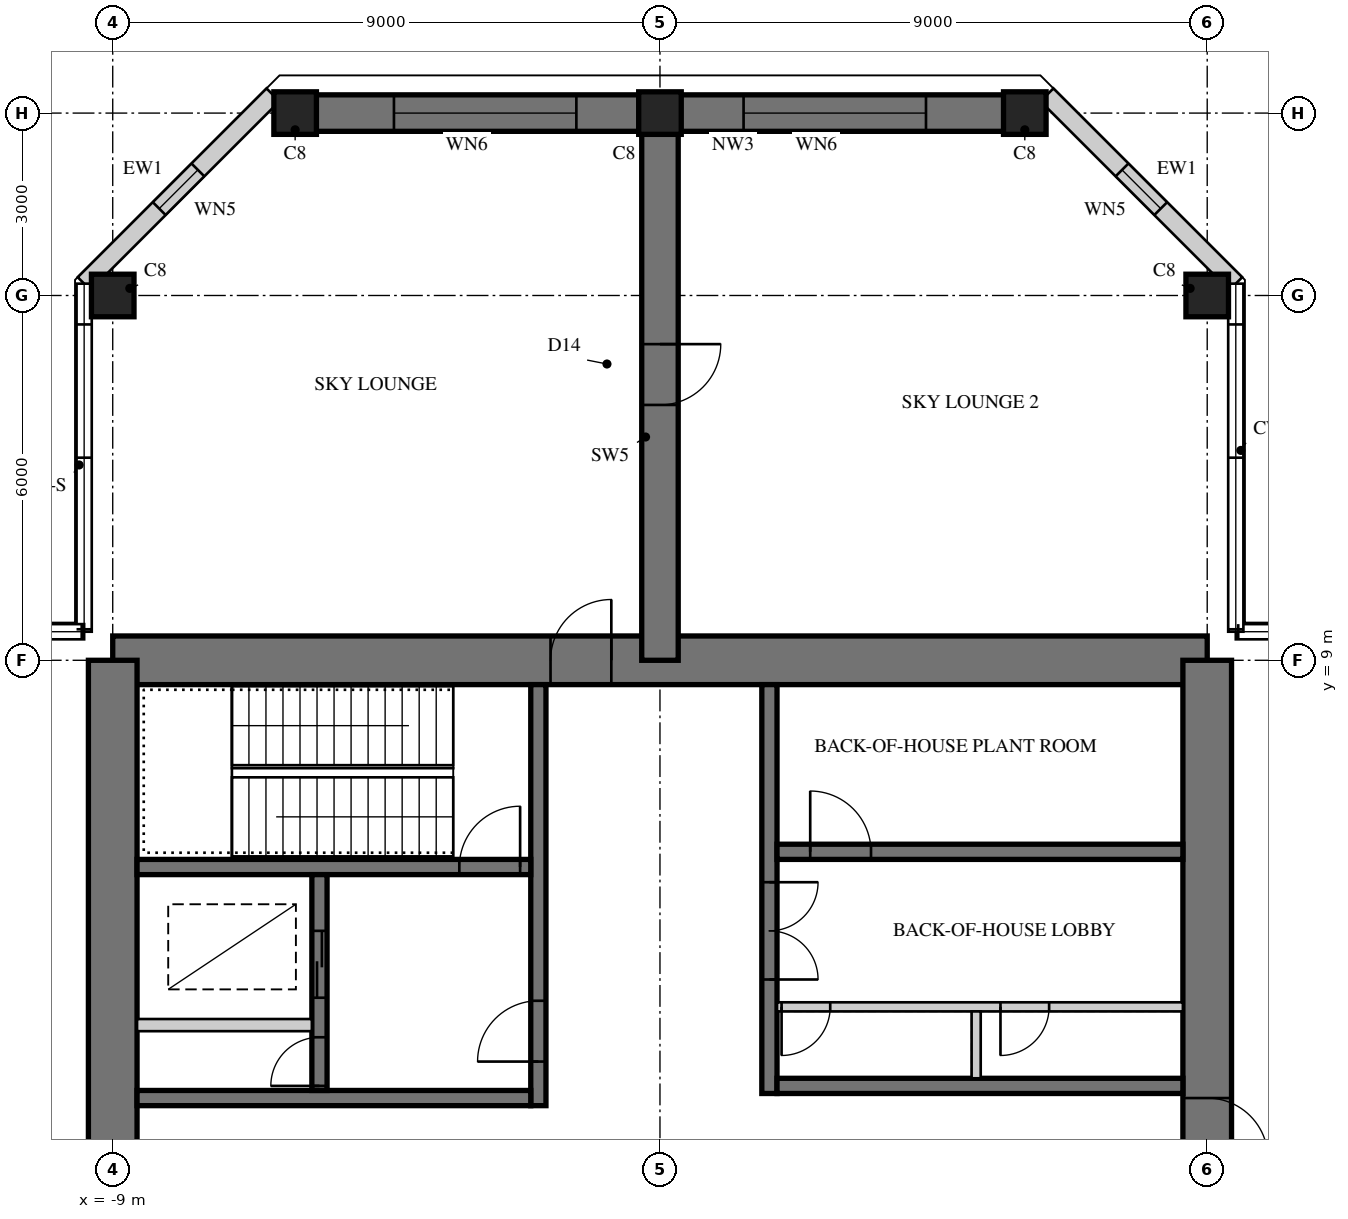
"""IFC4 building model, lengths in metres.
Left out: names, types, materials, properties, quantities, classifications, styles, units other than length and angle.
Written with IfcOpenShell. Run it as: python <this file> out.ifc"""

import sys

from ifc_helpers import new_model, si_unit, direction, frame, frame_2d, origin, origin_2d, place, context, subcontext, project, spatial, rectangle, hollow_rectangle, extrude, element, fill, save


model = new_model("IFC4")
c1 = context("Model", 3, precision=1e-05, world=origin(), true_north=direction((0.0, 1.0)))
c2 = subcontext(c1, "Body", "Model", "MODEL_VIEW")
j1 = project(units=[si_unit("LENGTHUNIT", "METRE"), si_unit("PLANEANGLEUNIT", "RADIAN")], contexts=[c1])
p1 = place(None, origin())
s1 = spatial("IfcSite", under=j1, at=p1, CompositionType="ELEMENT")
p2 = place(p1, origin())
s2 = spatial("IfcBuilding", under=s1, at=p2, CompositionType="ELEMENT")
p3 = place(p2, frame((0.0, 0.0, 288.3)))
s3 = spatial("IfcBuildingStorey", under=s2, at=p3, CompositionType="ELEMENT", Elevation=288.3)
p4 = place(p3, frame((9.0, 9.0, 0.0), z_axis=(0.0, 0.0, 1.0), x_axis=(-1.0, 0.0, 0.0)))
e1 = element("IfcWall", 1, at=p4, inside=s3, PredefinedType="SHEAR", context=c2, shape_type="SweptSolid", body=[
    extrude(rectangle(XDim=18.0, YDim=0.8, at=frame_2d((9.0, 0.0))), origin(), (0.0, 0.0, 1.0), 5.0),
])
p5 = place(p4, frame((9.8, 0.0, 0.0)))
e2 = element("IfcOpeningElement", 2, at=p5, cuts=e1, PredefinedType="OPENING", context=c2, shape_type="SweptSolid", body=[
    extrude(rectangle(XDim=1.0, YDim=2.4, at=frame_2d((0.5, 1.2))), frame((0.0, 0.41, 0.0), z_axis=(0.0, -1.0, 0.0), x_axis=(1.0, 0.0, 0.0)), (0.0, 0.0, 1.0), 0.82),
])
p6 = place(p3, frame((9.0, -9.0, 0.0), z_axis=(0.0, 0.0, 1.0), x_axis=(0.0, 1.0, 0.0)))
e3 = element("IfcWall", 3, at=p6, inside=s3, PredefinedType="SHEAR", context=c2, shape_type="SweptSolid", body=[
    extrude(rectangle(XDim=18.0, YDim=0.8, at=frame_2d((9.0, 0.0))), origin(), (0.0, 0.0, 1.0), 5.0),
])
p7 = place(p6, frame((9.8, 0.0, 0.0)))
e4 = element("IfcOpeningElement", 4, at=p7, cuts=e3, PredefinedType="OPENING", context=c2, shape_type="SweptSolid", body=[
    extrude(rectangle(XDim=1.0, YDim=2.4, at=frame_2d((0.5, 1.2))), frame((0.0, 0.41, 0.0), z_axis=(0.0, -1.0, 0.0), x_axis=(1.0, 0.0, 0.0)), (0.0, 0.0, 1.0), 0.82),
])
p8 = place(p3, frame((-9.0, 9.0, 0.0), z_axis=(0.0, 0.0, 1.0), x_axis=(0.0, -1.0, 0.0)))
e5 = element("IfcWall", 5, at=p8, inside=s3, PredefinedType="SHEAR", context=c2, shape_type="SweptSolid", body=[
    extrude(rectangle(XDim=18.0, YDim=0.8, at=frame_2d((9.0, 0.0))), origin(), (0.0, 0.0, 1.0), 5.0),
])
p9 = place(p8, frame((9.8, 0.0, 0.0)))
e6 = element("IfcOpeningElement", 6, at=p9, cuts=e5, PredefinedType="OPENING", context=c2, shape_type="SweptSolid", body=[
    extrude(rectangle(XDim=1.0, YDim=2.4, at=frame_2d((0.5, 1.2))), frame((0.0, 0.41, 0.0), z_axis=(0.0, -1.0, 0.0), x_axis=(1.0, 0.0, 0.0)), (0.0, 0.0, 1.0), 0.82),
])
p10 = place(p3, frame((1.8, 1.875, 0.0), z_axis=(0.0, 0.0, 1.0), x_axis=(0.0, 1.0, 0.0)))
e7 = element("IfcWall", 7, at=p10, inside=s3, PredefinedType="SHEAR", context=c2, shape_type="SweptSolid", body=[
    extrude(rectangle(XDim=6.725, YDim=0.25, at=frame_2d((3.363, 0.0))), origin(), (0.0, 0.0, 1.0), 5.0),
])
p11 = place(p10, frame((1.875, 0.0, 0.0)))
e8 = element("IfcOpeningElement", 8, at=p11, cuts=e7, PredefinedType="OPENING", context=c2, shape_type="SweptSolid", body=[
    extrude(rectangle(XDim=1.6, YDim=2.4, at=frame_2d((0.8, 1.2))), frame((0.0, 0.135, 0.0), z_axis=(0.0, -1.0, 0.0), x_axis=(1.0, 0.0, 0.0)), (0.0, 0.0, 1.0), 0.27),
])
p12 = place(p3, frame((1.925, 2.0, 0.0), z_axis=(0.0, 0.0, 1.0), x_axis=(1.0, 0.0, 0.0)))
e9 = element("IfcWall", 9, at=p12, inside=s3, PredefinedType="SHEAR", context=c2, shape_type="SweptSolid", body=[
    extrude(rectangle(XDim=6.675, YDim=0.25, at=frame_2d((3.337, 0.0))), origin(), (0.0, 0.0, 1.0), 5.0),
])
p13 = place(p3, frame((1.925, 5.85, 0.0), z_axis=(0.0, 0.0, 1.0), x_axis=(1.0, 0.0, 0.0)))
e10 = element("IfcWall", 10, at=p13, inside=s3, PredefinedType="SHEAR", context=c2, shape_type="SweptSolid", body=[
    extrude(rectangle(XDim=6.675, YDim=0.25, at=frame_2d((3.337, 0.0))), origin(), (0.0, 0.0, 1.0), 5.0),
])
p14 = place(p13, frame((0.546, 0.0, 0.0)))
e11 = element("IfcOpeningElement", 11, at=p14, cuts=e10, PredefinedType="OPENING", context=c2, shape_type="SweptSolid", body=[
    extrude(rectangle(XDim=1.0, YDim=2.1, at=frame_2d((0.5, 1.05))), frame((0.0, 0.135, 0.0), z_axis=(0.0, -1.0, 0.0), x_axis=(1.0, 0.0, 0.0)), (0.0, 0.0, 1.0), 0.27),
])
p15 = place(p3, frame((1.925, 3.3, 0.0), z_axis=(0.0, 0.0, 1.0), x_axis=(1.0, 0.0, 0.0)))
e12 = element("IfcWall", 12, at=p15, inside=s3, PredefinedType="PARTITIONING", context=c2, shape_type="SweptSolid", body=[
    extrude(rectangle(XDim=6.675, YDim=0.15, at=frame_2d((3.337, 0.0))), origin(), (0.0, 0.0, 1.0), 5.0),
])
p16 = place(p15, frame((0.075, 0.0, 0.0)))
e13 = element("IfcOpeningElement", 13, at=p16, cuts=e12, PredefinedType="OPENING", context=c2, shape_type="SweptSolid", body=[
    extrude(rectangle(XDim=0.8, YDim=2.1, at=frame_2d((0.4, 1.05))), frame((0.0, 0.085, 0.0), z_axis=(0.0, -1.0, 0.0), x_axis=(1.0, 0.0, 0.0)), (0.0, 0.0, 1.0), 0.17),
])
p17 = place(p15, frame((3.675, 0.0, 0.0)))
e14 = element("IfcOpeningElement", 14, at=p17, cuts=e12, PredefinedType="OPENING", context=c2, shape_type="SweptSolid", body=[
    extrude(rectangle(XDim=0.8, YDim=2.1, at=frame_2d((0.4, 1.05))), frame((0.0, 0.085, 0.0), z_axis=(0.0, -1.0, 0.0), x_axis=(1.0, 0.0, 0.0)), (0.0, 0.0, 1.0), 0.17),
])
p18 = place(p3, frame((5.2, 2.125, 0.0), z_axis=(0.0, 0.0, 1.0), x_axis=(0.0, 1.0, 0.0)))
e15 = element("IfcWall", 15, at=p18, inside=s3, PredefinedType="PARTITIONING", context=c2, shape_type="SweptSolid", body=[
    extrude(rectangle(XDim=1.1, YDim=0.15, at=frame_2d((0.55, 0.0))), origin(), (0.0, 0.0, 1.0), 5.0),
])
p19 = place(p3, frame((-2.0, 1.675, 0.0), z_axis=(0.0, 0.0, 1.0), x_axis=(0.0, 1.0, 0.0)))
e16 = element("IfcWall", 16, at=p19, inside=s3, PredefinedType="SHEAR", context=c2, shape_type="SweptSolid", body=[
    extrude(rectangle(XDim=6.925, YDim=0.25, at=frame_2d((3.462, 0.0))), origin(), (0.0, 0.0, 1.0), 5.0),
])
p20 = place(p19, frame((0.725, 0.0, 0.0)))
e17 = element("IfcOpeningElement", 17, at=p20, cuts=e16, PredefinedType="OPENING", context=c2, shape_type="SweptSolid", body=[
    extrude(rectangle(XDim=1.0, YDim=2.1, at=frame_2d((0.5, 1.05))), frame((0.0, 0.135, 0.0), z_axis=(0.0, -1.0, 0.0), x_axis=(1.0, 0.0, 0.0)), (0.0, 0.0, 1.0), 0.27),
])
p21 = place(p3, frame((-2.125, 1.8, 0.0), z_axis=(0.0, 0.0, 1.0), x_axis=(-1.0, 0.0, 0.0)))
e18 = element("IfcWall", 18, at=p21, inside=s3, PredefinedType="SHEAR", context=c2, shape_type="SweptSolid", body=[
    extrude(rectangle(XDim=6.475, YDim=0.25, at=frame_2d((3.238, 0.0))), origin(), (0.0, 0.0, 1.0), 5.0),
])
p22 = place(p3, frame((-2.125, 5.6, 0.0), z_axis=(0.0, 0.0, 1.0), x_axis=(-1.0, 0.0, 0.0)))
e19 = element("IfcWall", 19, at=p22, inside=s3, PredefinedType="SHEAR", context=c2, shape_type="SweptSolid", body=[
    extrude(rectangle(XDim=6.475, YDim=0.25, at=frame_2d((3.238, 0.0))), origin(), (0.0, 0.0, 1.0), 5.0),
])
p23 = place(p22, frame((0.175, 0.0, 0.0)))
e20 = element("IfcOpeningElement", 20, at=p23, cuts=e19, PredefinedType="OPENING", context=c2, shape_type="SweptSolid", body=[
    extrude(rectangle(XDim=1.0, YDim=2.1, at=frame_2d((0.5, 1.05))), frame((0.0, 0.135, 0.0), z_axis=(0.0, -1.0, 0.0), x_axis=(1.0, 0.0, 0.0)), (0.0, 0.0, 1.0), 0.27),
])
p24 = place(p3, frame((-5.6, 1.925, 0.0), z_axis=(0.0, 0.0, 1.0), x_axis=(0.0, 1.0, 0.0)))
e21 = element("IfcWall", 21, at=p24, inside=s3, PredefinedType="SHEAR", context=c2, shape_type="SweptSolid", body=[
    extrude(rectangle(XDim=3.55, YDim=0.25, at=frame_2d((1.775, 0.0))), origin(), (0.0, 0.0, 1.0), 5.0),
])
p25 = place(p24, frame((1.525, 0.0, 0.0)))
e22 = element("IfcOpeningElement", 22, at=p25, cuts=e21, PredefinedType="OPENING", context=c2, shape_type="SweptSolid", body=[
    extrude(rectangle(XDim=1.1, YDim=2.2, at=frame_2d((0.55, 1.1))), frame((0.0, 0.135, 0.0), z_axis=(0.0, -1.0, 0.0), x_axis=(1.0, 0.0, 0.0)), (0.0, 0.0, 1.0), 0.27),
])
p26 = place(p24, frame((0.075, 0.0, 0.0)))
e23 = element("IfcOpeningElement", 23, at=p26, cuts=e21, PredefinedType="OPENING", context=c2, shape_type="SweptSolid", body=[
    extrude(rectangle(XDim=0.8, YDim=2.1, at=frame_2d((0.4, 1.05))), frame((0.0, 0.135, 0.0), z_axis=(0.0, -1.0, 0.0), x_axis=(1.0, 0.0, 0.0)), (0.0, 0.0, 1.0), 0.27),
])
p27 = place(p3, frame((-5.725, 3.0, 0.0), z_axis=(0.0, 0.0, 1.0), x_axis=(-1.0, 0.0, 0.0)))
e24 = element("IfcWall", 24, at=p27, inside=s3, PredefinedType="PARTITIONING", context=c2, shape_type="SweptSolid", body=[
    extrude(rectangle(XDim=2.875, YDim=0.2, at=frame_2d((1.438, 0.0))), origin(), (0.0, 0.0, 1.0), 5.0),
])
p28 = place(p3, frame((0.0, 9.0, 0.0), z_axis=(0.0, 0.0, 1.0), x_axis=(0.0, 1.0, 0.0)))
e25 = element("IfcWall", 25, at=p28, inside=s3, PredefinedType="SHEAR", context=c2, shape_type="SweptSolid", body=[
    extrude(rectangle(XDim=9.0, YDim=0.6, at=frame_2d((4.5, 0.0))), origin(), (0.0, 0.0, 1.0), 5.0),
])
p29 = place(p28, frame((4.2, 0.0, 0.0)))
e26 = element("IfcOpeningElement", 26, at=p29, cuts=e25, PredefinedType="OPENING", context=c2, shape_type="SweptSolid", body=[
    extrude(rectangle(XDim=1.0, YDim=2.2, at=frame_2d((0.5, 1.1))), frame((0.0, 0.31, 0.0), z_axis=(0.0, -1.0, 0.0), x_axis=(1.0, 0.0, 0.0)), (0.0, 0.0, 1.0), 0.62),
])
p30 = place(p3, frame((6.0, 18.0, 0.0), z_axis=(0.0, 0.0, 1.0), x_axis=(-1.0, 0.0, 0.0)))
e27 = element("IfcWall", 27, at=p30, inside=s3, PredefinedType="SHEAR", context=c2, shape_type="SweptSolid", body=[
    extrude(rectangle(XDim=12.0, YDim=0.6, at=frame_2d((6.0, 0.0))), origin(), (0.0, 0.0, 1.0), 5.0),
])
p31 = place(p30, frame((1.625, 0.0, 0.6)))
e28 = element("IfcOpeningElement", 28, at=p31, cuts=e27, PredefinedType="OPENING", context=c2, shape_type="SweptSolid", body=[
    extrude(rectangle(XDim=3.0, YDim=2.4, at=frame_2d((1.5, 1.2))), frame((0.0, 0.31, 0.0), z_axis=(0.0, -1.0, 0.0), x_axis=(1.0, 0.0, 0.0)), (0.0, 0.0, 1.0), 0.62),
])
p32 = place(p30, frame((7.375, 0.0, 0.6)))
e29 = element("IfcOpeningElement", 29, at=p32, cuts=e27, PredefinedType="OPENING", context=c2, shape_type="SweptSolid", body=[
    extrude(rectangle(XDim=3.0, YDim=2.4, at=frame_2d((1.5, 1.2))), frame((0.0, 0.31, 0.0), z_axis=(0.0, -1.0, 0.0), x_axis=(1.0, 0.0, 0.0)), (0.0, 0.0, 1.0), 0.62),
])
for number, where, z_axis, x_axis in (
    (30, (9.0, 15.0, 0.0), (0.0, 0.0, 1.0), (1.0, 0.0, 0.0)),
    (31, (-9.0, 15.0, 0.0), (0.0, 0.0, 1.0), (1.0, 0.0, 0.0)),
    (32, (6.0, 18.0, 0.0), (0.0, 0.0, 1.0), (1.0, 0.0, 0.0)),
    (33, (0.0, 18.0, 0.0), (0.0, 0.0, 1.0), (1.0, 0.0, 0.0)),
    (34, (-6.0, 18.0, 0.0), (0.0, 0.0, 1.0), (1.0, 0.0, 0.0)),
):
    element("IfcColumn", number, at=place(p3, frame(where, z_axis=z_axis, x_axis=x_axis)), inside=s3, PredefinedType="COLUMN", context=c2, shape_type="SweptSolid", body=[
        extrude(rectangle(XDim=0.7, YDim=0.7, at=origin_2d()), origin(), (0.0, 0.0, 1.0), 5.0),
    ])
p33 = place(p3, frame((9.47, 15.195, 0.0), z_axis=(0.0, 0.0, 1.0), x_axis=(-0.70707898447, 0.707134576811, 0.0)))
e35 = element("IfcWall", 35, at=p33, inside=s3, PredefinedType="SOLIDWALL", context=c2, shape_type="SweptSolid", body=[
    extrude(rectangle(XDim=4.392, YDim=0.3, at=frame_2d((2.196, 0.0))), origin(), (0.0, 0.0, 1.0), 4.75),
])
p34 = place(p33, frame((1.746, 0.0, 0.3)))
e36 = element("IfcOpeningElement", 36, at=p34, cuts=e35, PredefinedType="OPENING", context=c2, shape_type="SweptSolid", body=[
    extrude(rectangle(XDim=0.9, YDim=2.4, at=frame_2d((0.45, 1.2))), frame((0.0, 0.16, 0.0), z_axis=(0.0, -1.0, 0.0), x_axis=(1.0, 0.0, 0.0)), (0.0, 0.0, 1.0), 0.32),
])
p35 = place(p3, frame((-6.365, 18.3, 0.0), z_axis=(0.0, 0.0, 1.0), x_axis=(-0.70707898447, -0.707134576811, 0.0)))
e37 = element("IfcWall", 37, at=p35, inside=s3, PredefinedType="SOLIDWALL", context=c2, shape_type="SweptSolid", body=[
    extrude(rectangle(XDim=4.392, YDim=0.3, at=frame_2d((2.196, 0.0))), origin(), (0.0, 0.0, 1.0), 4.75),
])
p36 = place(p35, frame((1.746, 0.0, 0.3)))
e38 = element("IfcOpeningElement", 38, at=p36, cuts=e37, PredefinedType="OPENING", context=c2, shape_type="SweptSolid", body=[
    extrude(rectangle(XDim=0.9, YDim=2.4, at=frame_2d((0.45, 1.2))), frame((0.0, 0.16, 0.0), z_axis=(0.0, -1.0, 0.0), x_axis=(1.0, 0.0, 0.0)), (0.0, 0.0, 1.0), 0.32),
])
p37 = place(p34, origin())
e39 = element("IfcWindow", 39, at=p37, inside=s3, PartitioningType="SINGLE_PANEL", PredefinedType="WINDOW", context=c2, shape_type="SweptSolid", body=[
    extrude(hollow_rectangle(XDim=0.9, YDim=2.4, WallThickness=0.06, at=frame_2d((0.45, 1.2))), frame((0.0, 0.03, 0.0), z_axis=(0.0, -1.0, 0.0), x_axis=(1.0, 0.0, 0.0)), (0.0, 0.0, 1.0), 0.06),
    extrude(rectangle(XDim=0.779, YDim=2.279, at=frame_2d((0.45, 1.2))), frame((0.0, 0.03, 0.0), z_axis=(0.0, -1.0, 0.0), x_axis=(1.0, 0.0, 0.0)), (0.0, 0.0, 1.0), 0.06),
])
fill(e36, e39)
p38 = place(p31, origin())
e40 = element("IfcWindow", 40, at=p38, inside=s3, PartitioningType="SINGLE_PANEL", PredefinedType="WINDOW", context=c2, shape_type="SweptSolid", body=[
    extrude(hollow_rectangle(XDim=3.0, YDim=2.4, WallThickness=0.06, at=frame_2d((1.5, 1.2))), frame((0.0, 0.03, 0.0), z_axis=(0.0, -1.0, 0.0), x_axis=(1.0, 0.0, 0.0)), (0.0, 0.0, 1.0), 0.06),
    extrude(rectangle(XDim=2.879, YDim=2.279, at=frame_2d((1.5, 1.2))), frame((0.0, 0.03, 0.0), z_axis=(0.0, -1.0, 0.0), x_axis=(1.0, 0.0, 0.0)), (0.0, 0.0, 1.0), 0.06),
])
fill(e28, e40)
p39 = place(p32, origin())
e41 = element("IfcWindow", 41, at=p39, inside=s3, PartitioningType="SINGLE_PANEL", PredefinedType="WINDOW", context=c2, shape_type="SweptSolid", body=[
    extrude(hollow_rectangle(XDim=3.0, YDim=2.4, WallThickness=0.06, at=frame_2d((1.5, 1.2))), frame((0.0, 0.03, 0.0), z_axis=(0.0, -1.0, 0.0), x_axis=(1.0, 0.0, 0.0)), (0.0, 0.0, 1.0), 0.06),
    extrude(rectangle(XDim=2.879, YDim=2.279, at=frame_2d((1.5, 1.2))), frame((0.0, 0.03, 0.0), z_axis=(0.0, -1.0, 0.0), x_axis=(1.0, 0.0, 0.0)), (0.0, 0.0, 1.0), 0.06),
])
fill(e29, e41)
p40 = place(p36, origin())
e42 = element("IfcWindow", 42, at=p40, inside=s3, PartitioningType="SINGLE_PANEL", PredefinedType="WINDOW", context=c2, shape_type="SweptSolid", body=[
    extrude(hollow_rectangle(XDim=0.9, YDim=2.4, WallThickness=0.06, at=frame_2d((0.45, 1.2))), frame((0.0, 0.03, 0.0), z_axis=(0.0, -1.0, 0.0), x_axis=(1.0, 0.0, 0.0)), (0.0, 0.0, 1.0), 0.06),
    extrude(rectangle(XDim=0.779, YDim=2.279, at=frame_2d((0.45, 1.2))), frame((0.0, 0.03, 0.0), z_axis=(0.0, -1.0, 0.0), x_axis=(1.0, 0.0, 0.0)), (0.0, 0.0, 1.0), 0.06),
])
fill(e38, e42)
p41 = place(p29, frame((1.0, 0.0, 0.0), z_axis=(0.0, 0.0, 1.0), x_axis=(-1.0, 0.0, 0.0)))
e43 = element("IfcDoor", 43, at=p41, inside=s3, OperationType="SINGLE_SWING_LEFT", PredefinedType="DOOR", context=c2, shape_type="SweptSolid", body=[
    extrude(rectangle(XDim=1.0, YDim=2.2, at=frame_2d((0.5, 1.1))), frame((0.0, 0.025, 0.0), z_axis=(0.0, -1.0, 0.0), x_axis=(1.0, 0.0, 0.0)), (0.0, 0.0, 1.0), 0.05),
])
fill(e26, e43)
p42 = place(p5, frame((1.0, 0.0, 0.0), z_axis=(0.0, 0.0, 1.0), x_axis=(-1.0, 0.0, 0.0)))
e44 = element("IfcDoor", 44, at=p42, inside=s3, OperationType="SINGLE_SWING_RIGHT", PredefinedType="DOOR", context=c2, shape_type="SweptSolid", body=[
    extrude(rectangle(XDim=1.0, YDim=2.4, at=frame_2d((0.5, 1.2))), frame((0.0, -0.005, 0.0), z_axis=(0.0, -1.0, 0.0), x_axis=(1.0, 0.0, 0.0)), (0.0, 0.0, 1.0), 0.05),
])
fill(e2, e44)
p43 = place(p7, frame((1.0, 0.0, 0.0), z_axis=(0.0, 0.0, 1.0), x_axis=(-1.0, 0.0, 0.0)))
e45 = element("IfcDoor", 45, at=p43, inside=s3, OperationType="SINGLE_SWING_RIGHT", PredefinedType="DOOR", context=c2, shape_type="SweptSolid", body=[
    extrude(rectangle(XDim=1.0, YDim=2.4, at=frame_2d((0.5, 1.2))), frame((0.0, -0.005, 0.0), z_axis=(0.0, -1.0, 0.0), x_axis=(1.0, 0.0, 0.0)), (0.0, 0.0, 1.0), 0.05),
])
fill(e4, e45)
p44 = place(p11, frame((1.6, 0.0, 0.0), z_axis=(0.0, 0.0, 1.0), x_axis=(-1.0, 0.0, 0.0)))
e46 = element("IfcDoor", 46, at=p44, inside=s3, OperationType="DOUBLE_DOOR_SINGLE_SWING", PredefinedType="DOOR", context=c2, shape_type="SweptSolid", body=[
    extrude(rectangle(XDim=1.6, YDim=2.4, at=frame_2d((0.8, 1.2))), frame((0.0, 0.025, 0.0), z_axis=(0.0, -1.0, 0.0), x_axis=(1.0, 0.0, 0.0)), (0.0, 0.0, 1.0), 0.05),
])
fill(e8, e46)
p45 = place(p16, frame((0.8, 0.0, 0.0), z_axis=(0.0, 0.0, 1.0), x_axis=(-1.0, 0.0, 0.0)))
e47 = element("IfcDoor", 47, at=p45, inside=s3, OperationType="SINGLE_SWING_RIGHT", PredefinedType="DOOR", context=c2, shape_type="SweptSolid", body=[
    extrude(rectangle(XDim=0.8, YDim=2.1, at=frame_2d((0.4, 1.05))), frame((0.0, 0.025, 0.0), z_axis=(0.0, -1.0, 0.0), x_axis=(1.0, 0.0, 0.0)), (0.0, 0.0, 1.0), 0.05),
])
fill(e13, e47)
p46 = place(p17, frame((0.8, 0.0, 0.0), z_axis=(0.0, 0.0, 1.0), x_axis=(-1.0, 0.0, 0.0)))
e48 = element("IfcDoor", 48, at=p46, inside=s3, OperationType="SINGLE_SWING_RIGHT", PredefinedType="DOOR", context=c2, shape_type="SweptSolid", body=[
    extrude(rectangle(XDim=0.8, YDim=2.1, at=frame_2d((0.4, 1.05))), frame((0.0, 0.025, 0.0), z_axis=(0.0, -1.0, 0.0), x_axis=(1.0, 0.0, 0.0)), (0.0, 0.0, 1.0), 0.05),
])
fill(e14, e48)
p47 = place(p20, origin())
e49 = element("IfcDoor", 49, at=p47, inside=s3, OperationType="SINGLE_SWING_LEFT", PredefinedType="DOOR", context=c2, shape_type="SweptSolid", body=[
    extrude(rectangle(XDim=1.0, YDim=2.1, at=frame_2d((0.5, 1.05))), frame((0.0, 0.025, 0.0), z_axis=(0.0, -1.0, 0.0), x_axis=(1.0, 0.0, 0.0)), (0.0, 0.0, 1.0), 0.05),
])
fill(e17, e49)
p48 = place(p23, frame((1.0, 0.0, 0.0), z_axis=(0.0, 0.0, 1.0), x_axis=(-1.0, 0.0, 0.0)))
e50 = element("IfcDoor", 50, at=p48, inside=s3, OperationType="SINGLE_SWING_RIGHT", PredefinedType="DOOR", context=c2, shape_type="SweptSolid", body=[
    extrude(rectangle(XDim=1.0, YDim=2.1, at=frame_2d((0.5, 1.05))), frame((0.0, 0.025, 0.0), z_axis=(0.0, -1.0, 0.0), x_axis=(1.0, 0.0, 0.0)), (0.0, 0.0, 1.0), 0.05),
])
fill(e20, e50)
p49 = place(p25, origin())
e51 = element("IfcDoor", 51, at=p49, inside=s3, OperationType="DOUBLE_DOOR_SLIDING", PredefinedType="DOOR", context=c2, shape_type="SweptSolid", body=[
    extrude(rectangle(XDim=1.1, YDim=2.2, at=frame_2d((0.55, 1.1))), frame((0.0, 0.025, 0.0), z_axis=(0.0, -1.0, 0.0), x_axis=(1.0, 0.0, 0.0)), (0.0, 0.0, 1.0), 0.05),
])
fill(e22, e51)
p50 = place(p26, origin())
e52 = element("IfcDoor", 52, at=p50, inside=s3, OperationType="SINGLE_SWING_LEFT", PredefinedType="DOOR", context=c2, shape_type="SweptSolid", body=[
    extrude(rectangle(XDim=0.8, YDim=2.1, at=frame_2d((0.4, 1.05))), frame((0.0, 0.025, 0.0), z_axis=(0.0, -1.0, 0.0), x_axis=(1.0, 0.0, 0.0)), (0.0, 0.0, 1.0), 0.05),
])
fill(e23, e52)
p51 = place(p14, origin())
e53 = element("IfcDoor", 53, at=p51, inside=s3, OperationType="SINGLE_SWING_LEFT", PredefinedType="DOOR", context=c2, shape_type="SweptSolid", body=[
    extrude(rectangle(XDim=1.0, YDim=2.1, at=frame_2d((0.5, 1.05))), frame((0.0, 0.025, 0.0), z_axis=(0.0, -1.0, 0.0), x_axis=(1.0, 0.0, 0.0)), (0.0, 0.0, 1.0), 0.05),
])
fill(e11, e53)
save(model, sys.argv[1])
